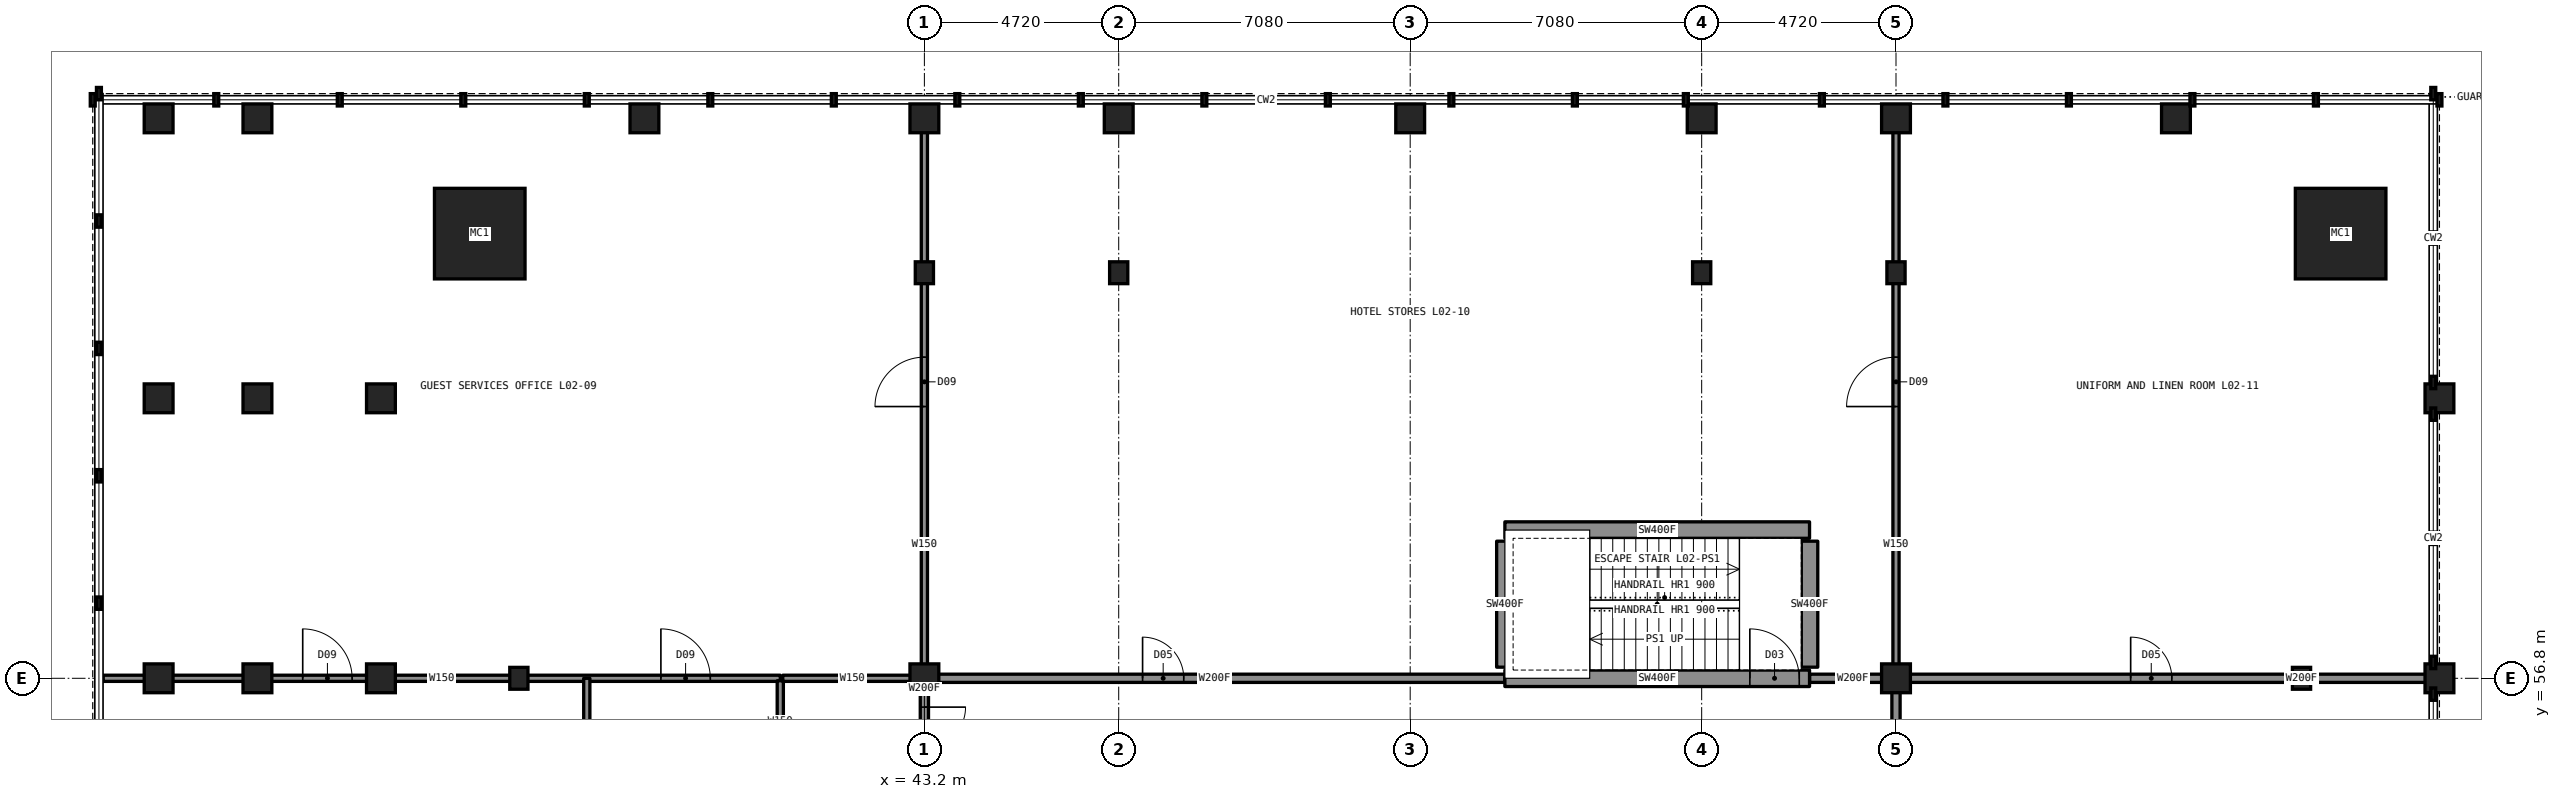
"""IFC4 building model, lengths in metres.
Left out: names, types, materials, properties, quantities, classifications, styles, units other than length and angle.
Written with IfcOpenShell. Run it as: python <this file> out.ifc"""

import sys

from ifc_helpers import new_model, si_unit, direction, frame, frame_2d, origin, origin_2d, place, context, subcontext, project, spatial, rectangle, hollow_rectangle, i_section, extrude, element, fill, save


model = new_model("IFC4")
c1 = context("Model", 3, precision=1e-05, world=origin(), true_north=direction((0.0, 1.0)))
c2 = subcontext(c1, "Body", "Model", "MODEL_VIEW")
j1 = project(units=[si_unit("LENGTHUNIT", "METRE"), si_unit("PLANEANGLEUNIT", "RADIAN")], contexts=[c1])
p1 = place(None, origin())
s1 = spatial("IfcSite", under=j1, at=p1, CompositionType="ELEMENT")
p2 = place(p1, origin())
s2 = spatial("IfcBuilding", under=s1, at=p2, CompositionType="ELEMENT")
p3 = place(p2, frame((0.0, 0.0, 11.0)))
s3 = spatial("IfcBuildingStorey", under=s2, at=p3, CompositionType="ELEMENT", Elevation=11.0)
for number, where, z_axis, x_axis in (
    (1, (33.35, 56.8, 0.0), (0.0, 0.0, 1.0), (1.0, 0.0, 0.0)),
    (2, (43.2, 66.65, 0.0), (0.0, 0.0, 1.0), (1.0, 0.0, 0.0)),
    (3, (47.92, 66.65, 0.0), (0.0, 0.0, 1.0), (1.0, 0.0, 0.0)),
    (4, (62.08, 66.65, 0.0), (0.0, 0.0, 1.0), (1.0, 0.0, 0.0)),
    (5, (66.8, 66.65, 0.0), (0.0, 0.0, 1.0), (1.0, 0.0, 0.0)),
    (6, (76.65, 56.8, 0.0), (0.0, 0.0, 1.0), (1.0, 0.0, 0.0)),
):
    element("IfcColumn", number, at=place(p3, frame(where, z_axis=z_axis, x_axis=x_axis)), inside=s3, PredefinedType="COLUMN", context=c2, shape_type="SweptSolid", body=[
        extrude(i_section(OverallWidth=0.442, OverallDepth=0.531, WebThickness=0.066, FlangeThickness=0.106, at=origin_2d()), origin(), (0.0, 0.0, 1.0), 5.0),
    ])
for number, where, z_axis, x_axis in (
    (7, (43.2, 56.8, 0.0), (0.0, 0.0, 1.0), (1.0, 0.0, 0.0)),
    (8, (66.8, 56.8, 0.0), (0.0, 0.0, 1.0), (1.0, 0.0, 0.0)),
):
    element("IfcColumn", number, at=place(p3, frame(where, z_axis=z_axis, x_axis=x_axis)), inside=s3, PredefinedType="COLUMN", context=c2, shape_type="SweptSolid", body=[
        extrude(hollow_rectangle(XDim=0.7, YDim=0.7, WallThickness=0.06, at=origin_2d()), origin(), (0.0, 0.0, 1.0), 5.0),
    ])
for number, where, z_axis, x_axis in (
    (9, (77.6, 67.6, 0.0), (0.0, 0.0, 1.0), (1.0, 0.0, 0.0)),
    (10, (32.4, 67.6, 0.0), (0.0, 0.0, 1.0), (1.0, 0.0, 0.0)),
):
    element("IfcColumn", number, at=place(p3, frame(where, z_axis=z_axis, x_axis=x_axis)), inside=s3, PredefinedType="COLUMN", context=c2, shape_type="SweptSolid", body=[
        extrude(hollow_rectangle(XDim=2.2, YDim=2.2, WallThickness=0.15, at=origin_2d()), origin(), (0.0, 0.0, 1.0), 5.0),
    ])
for number, where, z_axis, x_axis in (
    (11, (24.6, 56.8, 0.0), (0.0, 0.0, 1.0), (1.0, 0.0, 0.0)),
    (12, (24.6, 63.6, 0.0), (0.0, 0.0, 1.0), (1.0, 0.0, 0.0)),
    (13, (24.6, 70.4, 0.0), (0.0, 0.0, 1.0), (1.0, 0.0, 0.0)),
    (14, (27.0, 56.8, 0.0), (0.0, 0.0, 1.0), (1.0, 0.0, 0.0)),
    (15, (27.0, 63.6, 0.0), (0.0, 0.0, 1.0), (1.0, 0.0, 0.0)),
    (16, (27.0, 70.4, 0.0), (0.0, 0.0, 1.0), (1.0, 0.0, 0.0)),
    (17, (30.0, 56.8, 0.0), (0.0, 0.0, 1.0), (1.0, 0.0, 0.0)),
    (18, (30.0, 63.6, 0.0), (0.0, 0.0, 1.0), (1.0, 0.0, 0.0)),
    (19, (36.4, 70.4, 0.0), (0.0, 0.0, 1.0), (1.0, 0.0, 0.0)),
    (20, (43.2, 70.4, 0.0), (0.0, 0.0, 1.0), (1.0, 0.0, 0.0)),
    (21, (47.92, 70.4, 0.0), (0.0, 0.0, 1.0), (1.0, 0.0, 0.0)),
    (22, (55.0, 70.4, 0.0), (0.0, 0.0, 1.0), (1.0, 0.0, 0.0)),
    (23, (62.08, 70.4, 0.0), (0.0, 0.0, 1.0), (1.0, 0.0, 0.0)),
    (24, (66.8, 70.4, 0.0), (0.0, 0.0, 1.0), (1.0, 0.0, 0.0)),
    (25, (73.6, 70.4, 0.0), (0.0, 0.0, 1.0), (1.0, 0.0, 0.0)),
    (26, (80.0, 56.8, 0.0), (0.0, 0.0, 1.0), (1.0, 0.0, 0.0)),
    (27, (80.0, 63.6, 0.0), (0.0, 0.0, 1.0), (1.0, 0.0, 0.0)),
):
    element("IfcColumn", number, at=place(p3, frame(where, z_axis=z_axis, x_axis=x_axis)), inside=s3, PredefinedType="COLUMN", context=c2, shape_type="SweptSolid", body=[
        extrude(rectangle(XDim=0.7, YDim=0.7, at=origin_2d()), origin(), (0.0, 0.0, 1.0), 5.0),
    ])
p4 = place(p3, frame((43.2, 56.8, 0.0), z_axis=(0.0, 0.0, 1.0), x_axis=(1.0, 0.0, 0.0)))
e28 = element("IfcWall", 28, at=p4, inside=s3, PredefinedType="PARTITIONING", context=c2, shape_type="SweptSolid", body=[
    extrude(rectangle(XDim=14.1, YDim=0.2, at=frame_2d((7.05, 0.0))), origin(), (0.0, 0.0, 1.0), 4.65),
])
p5 = place(p4, frame((5.3, 0.0, 0.0)))
e29 = element("IfcOpeningElement", 29, at=p5, cuts=e28, PredefinedType="OPENING", context=c2, shape_type="SweptSolid", body=[
    extrude(rectangle(XDim=1.0, YDim=2.1, at=frame_2d((0.5, 1.05))), frame((0.0, 0.11, 0.0), z_axis=(0.0, -1.0, 0.0), x_axis=(1.0, 0.0, 0.0)), (0.0, 0.0, 1.0), 0.22),
])
p6 = place(p3, frame((64.7, 56.8, 0.0), z_axis=(0.0, 0.0, 1.0), x_axis=(1.0, 0.0, 0.0)))
e30 = element("IfcWall", 30, at=p6, inside=s3, PredefinedType="PARTITIONING", context=c2, shape_type="SweptSolid", body=[
    extrude(rectangle(XDim=2.1, YDim=0.2, at=frame_2d((1.05, 0.0))), origin(), (0.0, 0.0, 1.0), 4.65),
])
p7 = place(p3, frame((66.8, 56.8, 0.0), z_axis=(0.0, 0.0, 1.0), x_axis=(1.0, 0.0, 0.0)))
e31 = element("IfcWall", 31, at=p7, inside=s3, PredefinedType="PARTITIONING", context=c2, shape_type="SweptSolid", body=[
    extrude(rectangle(XDim=12.9, YDim=0.2, at=frame_2d((6.45, 0.0))), origin(), (0.0, 0.0, 1.0), 4.65),
])
p8 = place(p7, frame((5.7, 0.0, 0.0)))
e32 = element("IfcOpeningElement", 32, at=p8, cuts=e31, PredefinedType="OPENING", context=c2, shape_type="SweptSolid", body=[
    extrude(rectangle(XDim=1.0, YDim=2.1, at=frame_2d((0.5, 1.05))), frame((0.0, 0.11, 0.0), z_axis=(0.0, -1.0, 0.0), x_axis=(1.0, 0.0, 0.0)), (0.0, 0.0, 1.0), 0.22),
])
p9 = place(p3, frame((23.255, 56.8, 0.0), z_axis=(0.0, 0.0, 1.0), x_axis=(1.0, 0.0, 0.0)))
e33 = element("IfcWall", 33, at=p9, inside=s3, PredefinedType="PARTITIONING", context=c2, shape_type="SweptSolid", body=[
    extrude(rectangle(XDim=16.445, YDim=0.15, at=frame_2d((8.223, 0.0))), origin(), (0.0, 0.0, 1.0), 4.65),
])
p10 = place(p9, frame((13.545, 0.0, 0.0)))
e34 = element("IfcOpeningElement", 34, at=p10, cuts=e33, PredefinedType="OPENING", context=c2, shape_type="SweptSolid", body=[
    extrude(rectangle(XDim=1.2, YDim=2.2, at=frame_2d((0.6, 1.1))), frame((0.0, 0.085, 0.0), z_axis=(0.0, -1.0, 0.0), x_axis=(1.0, 0.0, 0.0)), (0.0, 0.0, 1.0), 0.17),
])
p11 = place(p9, frame((4.845, 0.0, 0.0)))
e35 = element("IfcOpeningElement", 35, at=p11, cuts=e33, PredefinedType="OPENING", context=c2, shape_type="SweptSolid", body=[
    extrude(rectangle(XDim=1.2, YDim=2.2, at=frame_2d((0.6, 1.1))), frame((0.0, 0.085, 0.0), z_axis=(0.0, -1.0, 0.0), x_axis=(1.0, 0.0, 0.0)), (0.0, 0.0, 1.0), 0.17),
])
p12 = place(p3, frame((57.3, 56.8, 0.0), z_axis=(0.0, 0.0, 1.0), x_axis=(1.0, 0.0, 0.0)))
e36 = element("IfcWall", 36, at=p12, inside=s3, PredefinedType="SHEAR", context=c2, shape_type="SweptSolid", body=[
    extrude(rectangle(XDim=7.4, YDim=0.4, at=frame_2d((3.7, 0.0))), origin(), (0.0, 0.0, 1.0), 5.0),
])
p13 = place(p12, frame((5.95, 0.0, 0.0)))
e37 = element("IfcOpeningElement", 37, at=p13, cuts=e36, PredefinedType="OPENING", context=c2, shape_type="SweptSolid", body=[
    extrude(rectangle(XDim=1.2, YDim=2.2, at=frame_2d((0.6, 1.1))), frame((0.0, 0.21, 0.0), z_axis=(0.0, -1.0, 0.0), x_axis=(1.0, 0.0, 0.0)), (0.0, 0.0, 1.0), 0.42),
])
p14 = place(p3, frame((57.3, 60.4, 0.0), z_axis=(0.0, 0.0, 1.0), x_axis=(1.0, 0.0, 0.0)))
e38 = element("IfcWall", 38, at=p14, inside=s3, PredefinedType="SHEAR", context=c2, shape_type="SweptSolid", body=[
    extrude(rectangle(XDim=7.4, YDim=0.4, at=frame_2d((3.7, 0.0))), origin(), (0.0, 0.0, 1.0), 5.0),
])
p15 = place(p3, frame((43.2, 56.8, 0.0), z_axis=(0.0, 0.0, 1.0), x_axis=(0.0, 1.0, 0.0)))
e39 = element("IfcWall", 39, at=p15, inside=s3, PredefinedType="PARTITIONING", context=c2, shape_type="SweptSolid", body=[
    extrude(rectangle(XDim=13.9, YDim=0.15, at=frame_2d((6.95, 0.0))), origin(), (0.0, 0.0, 1.0), 4.65),
])
p16 = place(p15, frame((6.6, 0.0, 0.0)))
e40 = element("IfcOpeningElement", 40, at=p16, cuts=e39, PredefinedType="OPENING", context=c2, shape_type="SweptSolid", body=[
    extrude(rectangle(XDim=1.2, YDim=2.2, at=frame_2d((0.6, 1.1))), frame((0.0, 0.085, 0.0), z_axis=(0.0, -1.0, 0.0), x_axis=(1.0, 0.0, 0.0)), (0.0, 0.0, 1.0), 0.17),
])
p17 = place(p3, frame((35.0, 33.2, 0.0), z_axis=(0.0, 0.0, 1.0), x_axis=(0.0, 1.0, 0.0)))
e41 = element("IfcWall", 41, at=p17, inside=s3, PredefinedType="PARTITIONING", context=c2, shape_type="SweptSolid", body=[
    extrude(rectangle(XDim=23.6, YDim=0.15, at=frame_2d((11.8, 0.0))), origin(), (0.0, 0.0, 1.0), 4.65),
])
p18 = place(p3, frame((66.8, 42.7, 0.0), z_axis=(0.0, 0.0, 1.0), x_axis=(0.0, 1.0, 0.0)))
e42 = element("IfcWall", 42, at=p18, inside=s3, PredefinedType="PARTITIONING", context=c2, shape_type="SweptSolid", body=[
    extrude(rectangle(XDim=14.1, YDim=0.2, at=frame_2d((7.05, 0.0))), origin(), (0.0, 0.0, 1.0), 4.65),
])
p19 = place(p18, frame((8.8, 0.0, 0.0)))
e43 = element("IfcOpeningElement", 43, at=p19, cuts=e42, PredefinedType="OPENING", context=c2, shape_type="SweptSolid", body=[
    extrude(rectangle(XDim=1.0, YDim=2.1, at=frame_2d((0.5, 1.05))), frame((0.0, 0.11, 0.0), z_axis=(0.0, -1.0, 0.0), x_axis=(1.0, 0.0, 0.0)), (0.0, 0.0, 1.0), 0.22),
])
p20 = place(p3, frame((66.8, 56.8, 0.0), z_axis=(0.0, 0.0, 1.0), x_axis=(0.0, 1.0, 0.0)))
e44 = element("IfcWall", 44, at=p20, inside=s3, PredefinedType="PARTITIONING", context=c2, shape_type="SweptSolid", body=[
    extrude(rectangle(XDim=13.9, YDim=0.15, at=frame_2d((6.95, 0.0))), origin(), (0.0, 0.0, 1.0), 4.65),
])
p21 = place(p20, frame((6.6, 0.0, 0.0)))
e45 = element("IfcOpeningElement", 45, at=p21, cuts=e44, PredefinedType="OPENING", context=c2, shape_type="SweptSolid", body=[
    extrude(rectangle(XDim=1.2, YDim=2.2, at=frame_2d((0.6, 1.1))), frame((0.0, 0.085, 0.0), z_axis=(0.0, -1.0, 0.0), x_axis=(1.0, 0.0, 0.0)), (0.0, 0.0, 1.0), 0.17),
])
for number, where, z_axis, x_axis in (
    (46, (57.3, 57.07, 0.0), (0.0, 0.0, 1.0), (0.0, 1.0, 0.0)),
    (47, (64.7, 57.07, 0.0), (0.0, 0.0, 1.0), (0.0, 1.0, 0.0)),
):
    element("IfcWall", number, at=place(p3, frame(where, z_axis=z_axis, x_axis=x_axis)), inside=s3, PredefinedType="SHEAR", context=c2, shape_type="SweptSolid", body=[
        extrude(rectangle(XDim=3.06, YDim=0.4, at=frame_2d((1.53, 0.0))), origin(), (0.0, 0.0, 1.0), 5.0),
    ])
p22 = place(p3, frame((43.2, 56.74, 0.0), z_axis=(0.0, 0.0, 1.0), x_axis=(0.0, -1.0, 0.0)))
e48 = element("IfcWall", 48, at=p22, inside=s3, PredefinedType="PARTITIONING", context=c2, shape_type="SweptSolid", body=[
    extrude(rectangle(XDim=1.98, YDim=0.2, at=frame_2d((0.99, 0.0))), origin(), (0.0, 0.0, 1.0), 4.65),
])
p23 = place(p22, frame((0.64, 0.0, 0.0)))
e49 = element("IfcOpeningElement", 49, at=p23, cuts=e48, PredefinedType="OPENING", context=c2, shape_type="SweptSolid", body=[
    extrude(rectangle(XDim=1.0, YDim=2.1, at=frame_2d((0.5, 1.05))), frame((0.0, 0.11, 0.0), z_axis=(0.0, -1.0, 0.0), x_axis=(1.0, 0.0, 0.0)), (0.0, 0.0, 1.0), 0.22),
])
p24 = place(p3, frame((39.7, 54.76, 0.0), z_axis=(0.0, 0.0, 1.0), x_axis=(0.0, 1.0, 0.0)))
e50 = element("IfcWall", 50, at=p24, inside=s3, PredefinedType="PARTITIONING", context=c2, shape_type="SweptSolid", body=[
    extrude(rectangle(XDim=1.98, YDim=0.15, at=frame_2d((0.99, 0.0))), origin(), (0.0, 0.0, 1.0), 4.65),
])
p25 = place(p3, frame((39.76, 56.8, 0.0), z_axis=(0.0, 0.0, 1.0), x_axis=(1.0, 0.0, 0.0)))
e51 = element("IfcWall", 51, at=p25, inside=s3, PredefinedType="PARTITIONING", context=c2, shape_type="SweptSolid", body=[
    extrude(rectangle(XDim=3.38, YDim=0.15, at=frame_2d((1.69, 0.0))), origin(), (0.0, 0.0, 1.0), 4.65),
])
p26 = place(p13, origin())
e52 = element("IfcDoor", 52, at=p26, inside=s3, OperationType="SINGLE_SWING_LEFT", PredefinedType="DOOR", context=c2, shape_type="SweptSolid", body=[
    extrude(rectangle(XDim=1.2, YDim=2.2, at=frame_2d((0.6, 1.1))), frame((0.0, 0.025, 0.0), z_axis=(0.0, -1.0, 0.0), x_axis=(1.0, 0.0, 0.0)), (0.0, 0.0, 1.0), 0.05),
])
fill(e37, e52)
p27 = place(p10, origin())
e53 = element("IfcDoor", 53, at=p27, inside=s3, OperationType="SINGLE_SWING_LEFT", PredefinedType="DOOR", context=c2, shape_type="SweptSolid", body=[
    extrude(rectangle(XDim=1.2, YDim=2.2, at=frame_2d((0.6, 1.1))), frame((0.0, 0.025, 0.0), z_axis=(0.0, -1.0, 0.0), x_axis=(1.0, 0.0, 0.0)), (0.0, 0.0, 1.0), 0.05),
])
fill(e34, e53)
p28 = place(p16, origin())
e54 = element("IfcDoor", 54, at=p28, inside=s3, OperationType="SINGLE_SWING_LEFT", PredefinedType="DOOR", context=c2, shape_type="SweptSolid", body=[
    extrude(rectangle(XDim=1.2, YDim=2.2, at=frame_2d((0.6, 1.1))), frame((0.0, 0.025, 0.0), z_axis=(0.0, -1.0, 0.0), x_axis=(1.0, 0.0, 0.0)), (0.0, 0.0, 1.0), 0.05),
])
fill(e40, e54)
p29 = place(p11, origin())
e55 = element("IfcDoor", 55, at=p29, inside=s3, OperationType="SINGLE_SWING_LEFT", PredefinedType="DOOR", context=c2, shape_type="SweptSolid", body=[
    extrude(rectangle(XDim=1.2, YDim=2.2, at=frame_2d((0.6, 1.1))), frame((0.0, 0.025, 0.0), z_axis=(0.0, -1.0, 0.0), x_axis=(1.0, 0.0, 0.0)), (0.0, 0.0, 1.0), 0.05),
])
fill(e35, e55)
p30 = place(p5, origin())
e56 = element("IfcDoor", 56, at=p30, inside=s3, OperationType="SINGLE_SWING_LEFT", PredefinedType="DOOR", context=c2, shape_type="SweptSolid", body=[
    extrude(rectangle(XDim=1.0, YDim=2.1, at=frame_2d((0.5, 1.05))), frame((0.0, 0.025, 0.0), z_axis=(0.0, -1.0, 0.0), x_axis=(1.0, 0.0, 0.0)), (0.0, 0.0, 1.0), 0.05),
])
fill(e29, e56)
p31 = place(p21, origin())
e57 = element("IfcDoor", 57, at=p31, inside=s3, OperationType="SINGLE_SWING_LEFT", PredefinedType="DOOR", context=c2, shape_type="SweptSolid", body=[
    extrude(rectangle(XDim=1.2, YDim=2.2, at=frame_2d((0.6, 1.1))), frame((0.0, 0.025, 0.0), z_axis=(0.0, -1.0, 0.0), x_axis=(1.0, 0.0, 0.0)), (0.0, 0.0, 1.0), 0.05),
])
fill(e45, e57)
p32 = place(p8, origin())
e58 = element("IfcDoor", 58, at=p32, inside=s3, OperationType="SINGLE_SWING_LEFT", PredefinedType="DOOR", context=c2, shape_type="SweptSolid", body=[
    extrude(rectangle(XDim=1.0, YDim=2.1, at=frame_2d((0.5, 1.05))), frame((0.0, 0.025, 0.0), z_axis=(0.0, -1.0, 0.0), x_axis=(1.0, 0.0, 0.0)), (0.0, 0.0, 1.0), 0.05),
])
fill(e32, e58)
p33 = place(p23, origin())
e59 = element("IfcDoor", 59, at=p33, inside=s3, OperationType="SINGLE_SWING_LEFT", PredefinedType="DOOR", context=c2, shape_type="SweptSolid", body=[
    extrude(rectangle(XDim=1.0, YDim=2.1, at=frame_2d((0.5, 1.05))), frame((0.0, 0.025, 0.0), z_axis=(0.0, -1.0, 0.0), x_axis=(1.0, 0.0, 0.0)), (0.0, 0.0, 1.0), 0.05),
])
fill(e49, e59)
save(model, sys.argv[1])
